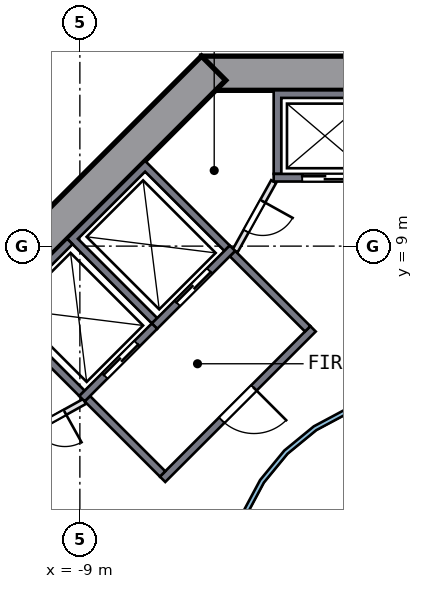
"""IFC4 building model, lengths in metres.
Left out: names, types, materials, properties, quantities, classifications, styles, units other than length and angle.
Written with IfcOpenShell. Run it as: python <this file> out.ifc"""

import sys

from ifc_helpers import new_model, si_unit, direction, frame, frame_2d, origin, place, context, subcontext, project, spatial, polyline, rectangle, outline, extrude, element, fill, save


model = new_model("IFC4")
c1 = context("Model", 3, precision=1e-05, world=origin(), true_north=direction((0.0, 1.0)))
c2 = subcontext(c1, "Body", "Model", "MODEL_VIEW")
j1 = project(units=[si_unit("LENGTHUNIT", "METRE"), si_unit("PLANEANGLEUNIT", "RADIAN")], contexts=[c1])
p1 = place(None, origin())
s1 = spatial("IfcSite", under=j1, at=p1, CompositionType="ELEMENT")
p2 = place(p1, origin())
s2 = spatial("IfcBuilding", under=s1, at=p2, CompositionType="ELEMENT")
p3 = place(p2, frame((0.0, 0.0, 39.0)))
s3 = spatial("IfcBuildingStorey", under=s2, at=p3, CompositionType="ELEMENT", Elevation=39.0)
p4 = place(p3, frame((5.799, 13.55, 0.0), z_axis=(0.0, 0.0, 1.0), x_axis=(-1.0, 0.0, 0.0)))
e1 = element("IfcWall", 1, at=p4, inside=s3, PredefinedType="SHEAR", context=c2, shape_type="SweptSolid", body=[
    extrude(rectangle(XDim=11.598, YDim=0.9, at=frame_2d((5.799, 0.0))), origin(), (0.0, 0.0, 1.0), 3.5),
])
p5 = place(p4, frame((4.899, 0.0, 0.0)))
e2 = element("IfcOpeningElement", 2, at=p5, cuts=e1, PredefinedType="OPENING", context=c2, shape_type="SweptSolid", body=[
    extrude(rectangle(XDim=1.8, YDim=2.1, at=frame_2d((0.9, 1.05))), frame((0.0, 0.46, 0.0), z_axis=(0.0, -1.0, 0.0), x_axis=(1.0, 0.0, 0.0)), (0.0, 0.0, 1.0), 0.92),
])
p6 = place(p3, frame((-5.481, 13.682, 0.0), z_axis=(0.0, 0.0, 1.0), x_axis=(-0.707106781, -0.707106781, 0.0)))
e3 = element("IfcWall", 3, at=p6, inside=s3, PredefinedType="SHEAR", context=c2, shape_type="SweptSolid", body=[
    extrude(rectangle(XDim=11.598, YDim=0.9, at=frame_2d((5.799, 0.0))), origin(), (0.0, 0.0, 1.0), 3.5),
])
p7 = place(p3, origin())
e4 = element("IfcWall", 4, at=p7, inside=s3, PredefinedType="SOLIDWALL", context=c2, shape_type="SweptSolid", body=[
    extrude(outline(polyline([(-3.9, 10.9), (-3.9, 13.1), (-1.2, 13.1), (-1.2, 10.9), (-1.4, 10.9), (-1.4, 12.9), (-3.7, 12.9), (-3.7, 10.9), (-3.9, 10.9)])), origin(), (0.0, 0.0, 1.0), 3.19),
])
p8 = place(p3, frame((-1.2, 10.8, 0.0), z_axis=(0.0, 0.0, 1.0), x_axis=(-1.0, 0.0, 0.0)))
e5 = element("IfcWall", 5, at=p8, inside=s3, PredefinedType="SOLIDWALL", context=c2, shape_type="SweptSolid", body=[
    extrude(rectangle(XDim=2.7, YDim=0.2, at=frame_2d((1.35, 0.0))), origin(), (0.0, 0.0, 1.0), 3.19),
])
p9 = place(p8, frame((0.75, 0.0, 0.0)))
e6 = element("IfcOpeningElement", 6, at=p9, cuts=e5, PredefinedType="OPENING", context=c2, shape_type="SweptSolid", body=[
    extrude(rectangle(XDim=1.2, YDim=2.1, at=frame_2d((0.6, 1.05))), frame((0.0, 0.11, 0.0), z_axis=(0.0, -1.0, 0.0), x_axis=(1.0, 0.0, 0.0)), (0.0, 0.0, 1.0), 0.22),
])
p10 = place(p3, origin())
e7 = element("IfcWall", 7, at=p10, inside=s3, PredefinedType="SOLIDWALL", context=c2, shape_type="SweptSolid", body=[
    extrude(outline(polyline([(-9.334, 9.192), (-7.283, 11.243), (-5.056, 9.016), (-5.197, 8.874), (-7.283, 10.96), (-9.051, 9.192), (-6.965, 7.106), (-7.106, 6.965), (-9.334, 9.192)])), origin(), (0.0, 0.0, 1.0), 3.19),
])
p11 = place(p3, frame((-4.985, 8.945, 0.0), z_axis=(0.0, 0.0, 1.0), x_axis=(-0.707106781, -0.707106781, 0.0)))
e8 = element("IfcWall", 8, at=p11, inside=s3, PredefinedType="SOLIDWALL", context=c2, shape_type="SweptSolid", body=[
    extrude(rectangle(XDim=2.9, YDim=0.2, at=frame_2d((1.45, 0.0))), origin(), (0.0, 0.0, 1.0), 3.19),
])
p12 = place(p11, frame((0.85, 0.0, 0.0)))
e9 = element("IfcOpeningElement", 9, at=p12, cuts=e8, PredefinedType="OPENING", context=c2, shape_type="SweptSolid", body=[
    extrude(rectangle(XDim=1.2, YDim=2.1, at=frame_2d((0.6, 1.05))), frame((0.0, 0.11, 0.0), z_axis=(0.0, -1.0, 0.0), x_axis=(1.0, 0.0, 0.0)), (0.0, 0.0, 1.0), 0.22),
])
p13 = place(p3, origin())
e10 = element("IfcWall", 10, at=p13, inside=s3, PredefinedType="SOLIDWALL", context=c2, shape_type="SweptSolid", body=[
    extrude(outline(polyline([(-11.243, 7.283), (-9.334, 9.192), (-9.192, 9.051), (-10.96, 7.283), (-8.874, 5.197), (-9.016, 5.056), (-11.243, 7.283)])), origin(), (0.0, 0.0, 1.0), 3.19),
])
p14 = place(p3, frame((-7.036, 6.894, 0.0), z_axis=(0.0, 0.0, 1.0), x_axis=(-0.707106781, -0.707106781, 0.0)))
e11 = element("IfcWall", 11, at=p14, inside=s3, PredefinedType="SOLIDWALL", context=c2, shape_type="SweptSolid", body=[
    extrude(rectangle(XDim=2.7, YDim=0.2, at=frame_2d((1.35, 0.0))), origin(), (0.0, 0.0, 1.0), 3.19),
])
p15 = place(p14, frame((0.65, 0.0, 0.0)))
e12 = element("IfcOpeningElement", 12, at=p15, cuts=e11, PredefinedType="OPENING", context=c2, shape_type="SweptSolid", body=[
    extrude(rectangle(XDim=1.2, YDim=2.1, at=frame_2d((0.6, 1.05))), frame((0.0, 0.11, 0.0), z_axis=(0.0, -1.0, 0.0), x_axis=(1.0, 0.0, 0.0)), (0.0, 0.0, 1.0), 0.22),
])
p16 = place(p3, frame((-2.864, 6.823, 0.0), z_axis=(0.0, 0.0, 1.0), x_axis=(-0.707106781, -0.707106781, 0.0)))
e13 = element("IfcWall", 13, at=p16, inside=s3, PredefinedType="SOLIDWALL", context=c2, shape_type="SweptSolid", body=[
    extrude(rectangle(XDim=5.6, YDim=0.2, at=frame_2d((2.8, 0.0))), origin(), (0.0, 0.0, 1.0), 3.19),
])
p17 = place(p16, frame((2.2, 0.0, 0.0)))
e14 = element("IfcOpeningElement", 14, at=p17, cuts=e13, PredefinedType="OPENING", context=c2, shape_type="SweptSolid", body=[
    extrude(rectangle(XDim=1.2, YDim=2.1, at=frame_2d((0.6, 1.05))), frame((0.0, 0.11, 0.0), z_axis=(0.0, -1.0, 0.0), x_axis=(1.0, 0.0, 0.0)), (0.0, 0.0, 1.0), 0.22),
])
for number, where, z_axis, x_axis in (
    (15, (-3.005, 6.823, 0.0), (0.0, 0.0, 1.0), (-0.707, 0.707, 0.0)),
    (16, (-6.823, 3.005, 0.0), (0.0, 0.0, 1.0), (-0.707, 0.707, 0.0)),
):
    element("IfcWall", number, at=place(p3, frame(where, z_axis=z_axis, x_axis=x_axis)), inside=s3, PredefinedType="SOLIDWALL", context=c2, shape_type="SweptSolid", body=[
        extrude(rectangle(XDim=2.8, YDim=0.2, at=frame_2d((1.4, 0.0))), origin(), (0.0, 0.0, 1.0), 3.19),
    ])
p18 = place(p3, frame((-3.9, 10.7, 0.0), z_axis=(0.0, 0.0, 1.0), x_axis=(-0.485692555, -0.874129705, 0.0)))
e17 = element("IfcWall", 17, at=p18, inside=s3, PredefinedType="PARTITIONING", context=c2, shape_type="SweptSolid", body=[
    extrude(rectangle(XDim=2.089, YDim=0.15, at=frame_2d((1.044, 0.0))), origin(), (0.0, 0.0, 1.0), 3.19),
])
p19 = place(p18, frame((0.594, 0.0, 0.0)))
e18 = element("IfcOpeningElement", 18, at=p19, cuts=e17, PredefinedType="OPENING", context=c2, shape_type="SweptSolid", body=[
    extrude(rectangle(XDim=0.9, YDim=2.1, at=frame_2d((0.45, 1.05))), frame((0.0, 0.085, 0.0), z_axis=(0.0, -1.0, 0.0), x_axis=(1.0, 0.0, 0.0)), (0.0, 0.0, 1.0), 0.17),
])
p20 = place(p3, frame((-8.874, 4.914, 0.0), z_axis=(0.0, 0.0, 1.0), x_axis=(-0.874129705, -0.485692555, 0.0)))
e19 = element("IfcWall", 19, at=p20, inside=s3, PredefinedType="PARTITIONING", context=c2, shape_type="SweptSolid", body=[
    extrude(rectangle(XDim=2.089, YDim=0.15, at=frame_2d((1.044, 0.0))), origin(), (0.0, 0.0, 1.0), 3.19),
])
p21 = place(p20, frame((0.594, 0.0, 0.0)))
e20 = element("IfcOpeningElement", 20, at=p21, cuts=e19, PredefinedType="OPENING", context=c2, shape_type="SweptSolid", body=[
    extrude(rectangle(XDim=0.9, YDim=2.1, at=frame_2d((0.45, 1.05))), frame((0.0, 0.085, 0.0), z_axis=(0.0, -1.0, 0.0), x_axis=(1.0, 0.0, 0.0)), (0.0, 0.0, 1.0), 0.17),
])
p22 = place(p3, origin())
e21 = element("IfcWall", 21, at=p22, inside=s3, PredefinedType="SOLIDWALL", context=c2, shape_type="SweptSolid", body=[
    extrude(outline(polyline([(5.021, -0.999), (4.73, -1.959), (4.257, -2.844), (3.62, -3.62), (2.844, -4.257), (1.959, -4.73), (0.999, -5.021), (0.0, -5.12), (-0.999, -5.021), (-1.959, -4.73), (-2.844, -4.257), (-3.62, -3.62), (-4.257, -2.844), (-4.73, -1.959), (-5.021, -0.999), (-5.12, 0.0), (-5.021, 0.999), (-4.73, 1.959), (-4.257, 2.844), (-3.62, 3.62), (-2.844, 4.257), (-1.959, 4.73), (-0.999, 5.021), (0.0, 5.12), (0.999, 5.021), (1.959, 4.73), (2.844, 4.257), (3.62, 3.62), (4.257, 2.844), (4.73, 1.959), (5.021, 0.999), (5.12, 0.0), (5.021, -0.999)]), holes=[polyline([(4.904, 0.976), (4.619, 1.913), (4.157, 2.778), (3.535, 3.535), (2.778, 4.157), (1.913, 4.619), (0.976, 4.904), (0.0, 5.0), (-0.976, 4.904), (-1.913, 4.619), (-2.778, 4.157), (-3.535, 3.535), (-4.157, 2.778), (-4.619, 1.913), (-4.904, 0.976), (-5.0, 0.0), (-4.904, -0.976), (-4.619, -1.913), (-4.157, -2.778), (-3.535, -3.535), (-2.778, -4.157), (-1.913, -4.619), (-0.976, -4.904), (0.0, -5.0), (0.976, -4.904), (1.913, -4.619), (2.778, -4.157), (3.535, -3.535), (4.157, -2.778), (4.619, -1.913), (4.904, -0.976), (5.0, 0.0), (4.904, 0.976)])]), origin(), (0.0, 0.0, 1.0), 3.19),
])
p23 = place(p3, frame((-13.216, 12.781, 0.0), z_axis=(0.0, 0.0, 1.0), x_axis=(0.85751836, 0.514453362, 0.0)))
e22 = element("IfcWall", 22, at=p23, inside=s3, PredefinedType="SOLIDWALL", context=c2, shape_type="SweptSolid", body=[
    extrude(rectangle(XDim=9.316, YDim=0.2, at=frame_2d((4.658, 0.0))), origin(), (0.0, 0.0, 1.0), 3.19),
])
p24 = place(p23, frame((5.15, 0.0, 0.0)))
e23 = element("IfcOpeningElement", 23, at=p24, cuts=e22, PredefinedType="OPENING", context=c2, shape_type="SweptSolid", body=[
    extrude(rectangle(XDim=1.0, YDim=2.1, at=frame_2d((0.5, 1.05))), frame((0.0, 0.11, 0.0), z_axis=(0.0, -1.0, 0.0), x_axis=(1.0, 0.0, 0.0)), (0.0, 0.0, 1.0), 0.22),
])
p25 = place(p9, origin())
e24 = element("IfcDoor", 24, at=p25, inside=s3, OperationType="DOUBLE_DOOR_SLIDING", PredefinedType="DOOR", context=c2, shape_type="SweptSolid", body=[
    extrude(rectangle(XDim=1.2, YDim=2.1, at=frame_2d((0.6, 1.05))), frame((0.0, 0.025, 0.0), z_axis=(0.0, -1.0, 0.0), x_axis=(1.0, 0.0, 0.0)), (0.0, 0.0, 1.0), 0.05),
])
fill(e6, e24)
p26 = place(p12, origin())
e25 = element("IfcDoor", 25, at=p26, inside=s3, OperationType="DOUBLE_DOOR_SLIDING", PredefinedType="DOOR", context=c2, shape_type="SweptSolid", body=[
    extrude(rectangle(XDim=1.2, YDim=2.1, at=frame_2d((0.6, 1.05))), frame((0.0, 0.025, 0.0), z_axis=(0.0, -1.0, 0.0), x_axis=(1.0, 0.0, 0.0)), (0.0, 0.0, 1.0), 0.05),
])
fill(e9, e25)
p27 = place(p15, origin())
e26 = element("IfcDoor", 26, at=p27, inside=s3, OperationType="DOUBLE_DOOR_SLIDING", PredefinedType="DOOR", context=c2, shape_type="SweptSolid", body=[
    extrude(rectangle(XDim=1.2, YDim=2.1, at=frame_2d((0.6, 1.05))), frame((0.0, 0.025, 0.0), z_axis=(0.0, -1.0, 0.0), x_axis=(1.0, 0.0, 0.0)), (0.0, 0.0, 1.0), 0.05),
])
fill(e12, e26)
p28 = place(p17, origin())
e27 = element("IfcDoor", 27, at=p28, inside=s3, OperationType="SINGLE_SWING_LEFT", PredefinedType="DOOR", context=c2, shape_type="SweptSolid", body=[
    extrude(rectangle(XDim=1.2, YDim=2.1, at=frame_2d((0.6, 1.05))), frame((0.0, 0.025, 0.0), z_axis=(0.0, -1.0, 0.0), x_axis=(1.0, 0.0, 0.0)), (0.0, 0.0, 1.0), 0.05),
])
fill(e14, e27)
p29 = place(p19, origin())
e28 = element("IfcDoor", 28, at=p29, inside=s3, OperationType="SINGLE_SWING_LEFT", PredefinedType="DOOR", context=c2, shape_type="SweptSolid", body=[
    extrude(rectangle(XDim=0.9, YDim=2.1, at=frame_2d((0.45, 1.05))), frame((0.0, 0.025, 0.0), z_axis=(0.0, -1.0, 0.0), x_axis=(1.0, 0.0, 0.0)), (0.0, 0.0, 1.0), 0.05),
])
fill(e18, e28)
p30 = place(p21, origin())
e29 = element("IfcDoor", 29, at=p30, inside=s3, OperationType="SINGLE_SWING_LEFT", PredefinedType="DOOR", context=c2, shape_type="SweptSolid", body=[
    extrude(rectangle(XDim=0.9, YDim=2.1, at=frame_2d((0.45, 1.05))), frame((0.0, 0.025, 0.0), z_axis=(0.0, -1.0, 0.0), x_axis=(1.0, 0.0, 0.0)), (0.0, 0.0, 1.0), 0.05),
])
fill(e20, e29)
save(model, sys.argv[1])
